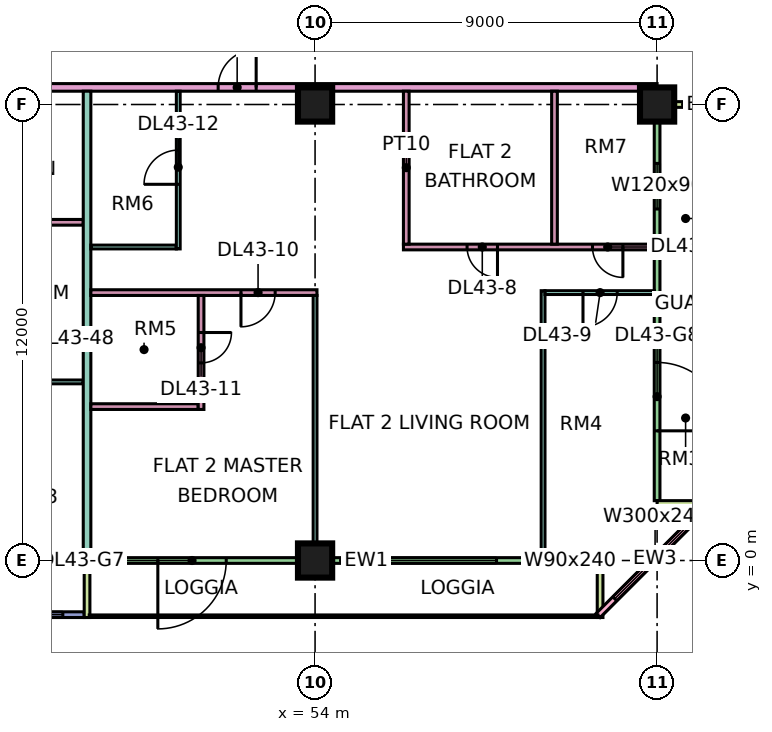
"""IFC4 building model, lengths in metres.
Left out: names, types, materials, properties, quantities, classifications, styles, units other than length and angle.
Written with IfcOpenShell. Run it as: python <this file> out.ifc"""

import sys

from ifc_helpers import new_model, si_unit, direction, frame, frame_2d, origin, origin_2d, place, context, subcontext, project, spatial, rectangle, extrude, element, fill, save


model = new_model("IFC4")
c1 = context("Model", 3, precision=1e-05, world=origin(), true_north=direction((0.0, 1.0)))
c2 = subcontext(c1, "Body", "Model", "MODEL_VIEW")
j1 = project(units=[si_unit("LENGTHUNIT", "METRE"), si_unit("PLANEANGLEUNIT", "RADIAN")], contexts=[c1])
p1 = place(None, origin())
s1 = spatial("IfcSite", under=j1, at=p1, CompositionType="ELEMENT")
p2 = place(p1, origin())
s2 = spatial("IfcBuilding", under=s1, at=p2, CompositionType="ELEMENT")
p3 = place(p2, frame((0.0, 0.0, 187.4)))
s3 = spatial("IfcBuildingStorey", under=s2, at=p3, CompositionType="ELEMENT", Elevation=187.4)
for number, where, z_axis, x_axis in (
    (1, (54.0, 0.0, 0.0), (0.0, 0.0, 1.0), (1.0, 0.0, 0.0)),
    (2, (54.0, 12.0, 0.0), (0.0, 0.0, 1.0), (1.0, 0.0, 0.0)),
    (3, (63.0, 12.0, 0.0), (0.0, 0.0, 1.0), (1.0, 0.0, 0.0)),
):
    element("IfcColumn", number, at=place(p3, frame(where, z_axis=z_axis, x_axis=x_axis)), inside=s3, PredefinedType="COLUMN", context=c2, shape_type="SweptSolid", body=[
        extrude(rectangle(XDim=0.9, YDim=0.9, at=origin_2d()), origin(), (0.0, 0.0, 1.0), 3.75),
    ])
p4 = place(p3, frame((36.075, -1.425, 0.0), z_axis=(0.0, 0.0, 1.0), x_axis=(1.0, 0.0, 0.0)))
e4 = element("IfcWall", 4, at=p4, inside=s3, PredefinedType="SOLIDWALL", context=c2, shape_type="SweptSolid", body=[
    extrude(rectangle(XDim=11.85, YDim=0.15, at=frame_2d((5.925, 0.0))), origin(), (0.0, 0.0, 1.0), 3.35),
])
p5 = place(p4, frame((1.462, 0.0, 0.45)))
e5 = element("IfcOpeningElement", 5, at=p5, cuts=e4, PredefinedType="OPENING", context=c2, shape_type="SweptSolid", body=[
    extrude(rectangle(XDim=3.0, YDim=2.4, at=frame_2d((1.5, 1.2))), frame((0.0, 0.085, 0.0), z_axis=(0.0, -1.0, 0.0), x_axis=(1.0, 0.0, 0.0)), (0.0, 0.0, 1.0), 0.17),
])
p6 = place(p4, frame((6.525, 0.0, 0.45)))
e6 = element("IfcOpeningElement", 6, at=p6, cuts=e4, PredefinedType="OPENING", context=c2, shape_type="SweptSolid", body=[
    extrude(rectangle(XDim=1.8, YDim=2.4, at=frame_2d((0.9, 1.2))), frame((0.0, 0.085, 0.0), z_axis=(0.0, -1.0, 0.0), x_axis=(1.0, 0.0, 0.0)), (0.0, 0.0, 1.0), 0.17),
])
p7 = place(p4, frame((9.488, 0.0, 0.45)))
e7 = element("IfcOpeningElement", 7, at=p7, cuts=e4, PredefinedType="OPENING", context=c2, shape_type="SweptSolid", body=[
    extrude(rectangle(XDim=1.8, YDim=2.4, at=frame_2d((0.9, 1.2))), frame((0.0, 0.085, 0.0), z_axis=(0.0, -1.0, 0.0), x_axis=(1.0, 0.0, 0.0)), (0.0, 0.0, 1.0), 0.17),
])
p8 = place(p3, frame((48.075, 0.0, 0.0), z_axis=(0.0, 0.0, 1.0), x_axis=(1.0, 0.0, 0.0)))
e8 = element("IfcWall", 8, at=p8, inside=s3, PredefinedType="SOLIDWALL", context=c2, shape_type="SweptSolid", body=[
    extrude(rectangle(XDim=13.35, YDim=0.15, at=frame_2d((6.675, 0.0))), origin(), (0.0, 0.0, 1.0), 3.35),
])
p9 = place(p8, frame((1.788, 0.0, 0.0)))
e9 = element("IfcOpeningElement", 9, at=p9, cuts=e8, PredefinedType="OPENING", context=c2, shape_type="SweptSolid", body=[
    extrude(rectangle(XDim=1.8, YDim=2.4, at=frame_2d((0.9, 1.2))), frame((0.0, 0.085, 0.0), z_axis=(0.0, -1.0, 0.0), x_axis=(1.0, 0.0, 0.0)), (0.0, 0.0, 1.0), 0.17),
])
p10 = place(p8, frame((7.7, 0.0, 0.45)))
e10 = element("IfcOpeningElement", 10, at=p10, cuts=e8, PredefinedType="OPENING", context=c2, shape_type="SweptSolid", body=[
    extrude(rectangle(XDim=3.0, YDim=2.4, at=frame_2d((1.5, 1.2))), frame((0.0, 0.085, 0.0), z_axis=(0.0, -1.0, 0.0), x_axis=(1.0, 0.0, 0.0)), (0.0, 0.0, 1.0), 0.17),
])
p11 = place(p8, frame((12.188, 0.0, 0.45)))
e11 = element("IfcOpeningElement", 11, at=p11, cuts=e8, PredefinedType="OPENING", context=c2, shape_type="SweptSolid", body=[
    extrude(rectangle(XDim=0.9, YDim=2.4, at=frame_2d((0.45, 1.2))), frame((0.0, 0.085, 0.0), z_axis=(0.0, -1.0, 0.0), x_axis=(1.0, 0.0, 0.0)), (0.0, 0.0, 1.0), 0.17),
])
for number, where, z_axis, x_axis in (
    (12, (48.0, -1.5, 0.0), (0.0, 0.0, 1.0), (0.0, 1.0, 0.0)),
    (13, (61.5, -1.5, 0.0), (0.0, 0.0, 1.0), (0.0, 1.0, 0.0)),
):
    element("IfcWall", number, at=place(p3, frame(where, z_axis=z_axis, x_axis=x_axis)), inside=s3, PredefinedType="SOLIDWALL", context=c2, shape_type="SweptSolid", body=[
        extrude(rectangle(XDim=1.5, YDim=0.15, at=frame_2d((0.75, 0.0))), origin(), (0.0, 0.0, 1.0), 3.35),
    ])
p12 = place(p3, frame((61.447, -1.447, 0.0), z_axis=(0.0, 0.0, 1.0), x_axis=(0.707106781187, 0.707106781187, 0.0)))
e14 = element("IfcWall", 14, at=p12, inside=s3, PredefinedType="SOLIDWALL", context=c2, shape_type="SweptSolid", body=[
    extrude(rectangle(XDim=4.243, YDim=0.15, at=frame_2d((2.121, 0.0))), origin(), (0.0, 0.0, 1.0), 3.35),
])
p13 = place(p12, frame((0.621, 0.0, 0.45)))
e15 = element("IfcOpeningElement", 15, at=p13, cuts=e14, PredefinedType="OPENING", context=c2, shape_type="SweptSolid", body=[
    extrude(rectangle(XDim=3.0, YDim=2.4, at=frame_2d((1.5, 1.2))), frame((0.0, 0.085, 0.0), z_axis=(0.0, -1.0, 0.0), x_axis=(1.0, 0.0, 0.0)), (0.0, 0.0, 1.0), 0.17),
])
p14 = place(p3, frame((63.0, 1.575, 0.0), z_axis=(0.0, 0.0, 1.0), x_axis=(0.0, 1.0, 0.0)))
e16 = element("IfcWall", 16, at=p14, inside=s3, PredefinedType="SOLIDWALL", context=c2, shape_type="SweptSolid", body=[
    extrude(rectangle(XDim=10.35, YDim=0.15, at=frame_2d((5.175, 0.0))), origin(), (0.0, 0.0, 1.0), 3.35),
])
p15 = place(p14, frame((1.837, 0.0, 0.0)))
e17 = element("IfcOpeningElement", 17, at=p15, cuts=e16, PredefinedType="OPENING", context=c2, shape_type="SweptSolid", body=[
    extrude(rectangle(XDim=1.8, YDim=2.4, at=frame_2d((0.9, 1.2))), frame((0.0, 0.085, 0.0), z_axis=(0.0, -1.0, 0.0), x_axis=(1.0, 0.0, 0.0)), (0.0, 0.0, 1.0), 0.17),
])
p16 = place(p14, frame((7.675, 0.0, 1.7)))
e18 = element("IfcOpeningElement", 18, at=p16, cuts=e16, PredefinedType="OPENING", context=c2, shape_type="SweptSolid", body=[
    extrude(rectangle(XDim=1.2, YDim=0.9, at=frame_2d((0.6, 0.45))), frame((0.0, 0.085, 0.0), z_axis=(0.0, -1.0, 0.0), x_axis=(1.0, 0.0, 0.0)), (0.0, 0.0, 1.0), 0.17),
])
for number, where, z_axis, x_axis in (
    (19, (64.5, 1.5, 0.0), (0.0, 0.0, 1.0), (-1.0, 0.0, 0.0)),
    (20, (64.5, 12.0, 0.0), (0.0, 0.0, 1.0), (-1.0, 0.0, 0.0)),
):
    element("IfcWall", number, at=place(p3, frame(where, z_axis=z_axis, x_axis=x_axis)), inside=s3, PredefinedType="SOLIDWALL", context=c2, shape_type="SweptSolid", body=[
        extrude(rectangle(XDim=1.5, YDim=0.15, at=frame_2d((0.75, 0.0))), origin(), (0.0, 0.0, 1.0), 3.35),
    ])
p17 = place(p3, frame((33.05, 4.7, 0.0), z_axis=(0.0, 0.0, 1.0), x_axis=(1.0, 0.0, 0.0)))
e21 = element("IfcWall", 21, at=p17, inside=s3, PredefinedType="PARTITIONING", context=c2, shape_type="SweptSolid", body=[
    extrude(rectangle(XDim=14.85, YDim=0.1, at=frame_2d((7.425, 0.0))), origin(), (0.0, 0.0, 1.0), 3.35),
])
p18 = place(p17, frame((10.0, 0.0, 0.0)))
e22 = element("IfcOpeningElement", 22, at=p18, cuts=e21, PredefinedType="OPENING", context=c2, shape_type="SweptSolid", body=[
    extrude(rectangle(XDim=0.9, YDim=2.1, at=frame_2d((0.45, 1.05))), frame((0.0, 0.06, 0.0), z_axis=(0.0, -1.0, 0.0), x_axis=(1.0, 0.0, 0.0)), (0.0, 0.0, 1.0), 0.12),
])
p19 = place(p17, frame((13.0, 0.0, 0.0)))
e23 = element("IfcOpeningElement", 23, at=p19, cuts=e21, PredefinedType="OPENING", context=c2, shape_type="SweptSolid", body=[
    extrude(rectangle(XDim=0.9, YDim=2.1, at=frame_2d((0.45, 1.05))), frame((0.0, 0.06, 0.0), z_axis=(0.0, -1.0, 0.0), x_axis=(1.0, 0.0, 0.0)), (0.0, 0.0, 1.0), 0.12),
])
p20 = place(p17, frame((4.0, 0.0, 0.0)))
e24 = element("IfcOpeningElement", 24, at=p20, cuts=e21, PredefinedType="OPENING", context=c2, shape_type="SweptSolid", body=[
    extrude(rectangle(XDim=0.9, YDim=2.1, at=frame_2d((0.45, 1.05))), frame((0.0, 0.06, 0.0), z_axis=(0.0, -1.0, 0.0), x_axis=(1.0, 0.0, 0.0)), (0.0, 0.0, 1.0), 0.12),
])
p21 = place(p3, frame((40.65, 12.45, 0.0), z_axis=(0.0, 0.0, 1.0), x_axis=(1.0, 0.0, 0.0)))
e25 = element("IfcWall", 25, at=p21, inside=s3, PredefinedType="PARTITIONING", context=c2, shape_type="SweptSolid", body=[
    extrude(rectangle(XDim=22.35, YDim=0.2, at=frame_2d((11.175, 0.0))), origin(), (0.0, 0.0, 1.0), 3.35),
])
p22 = place(p21, frame((10.8, 0.0, 0.0)))
e26 = element("IfcOpeningElement", 26, at=p22, cuts=e25, PredefinedType="OPENING", context=c2, shape_type="SweptSolid", body=[
    extrude(rectangle(XDim=1.0, YDim=2.1, at=frame_2d((0.5, 1.05))), frame((0.0, 0.11, 0.0), z_axis=(0.0, -1.0, 0.0), x_axis=(1.0, 0.0, 0.0)), (0.0, 0.0, 1.0), 0.22),
])
p23 = place(p21, frame((1.05, 0.0, 0.0)))
e27 = element("IfcOpeningElement", 27, at=p23, cuts=e25, PredefinedType="OPENING", context=c2, shape_type="SweptSolid", body=[
    extrude(rectangle(XDim=1.0, YDim=2.1, at=frame_2d((0.5, 1.05))), frame((0.0, 0.11, 0.0), z_axis=(0.0, -1.0, 0.0), x_axis=(1.0, 0.0, 0.0)), (0.0, 0.0, 1.0), 0.22),
])
p24 = place(p3, frame((43.725, 5.9, 0.0), z_axis=(0.0, 0.0, 1.0), x_axis=(1.0, 0.0, 0.0)))
e28 = element("IfcWall", 28, at=p24, inside=s3, PredefinedType="PARTITIONING", context=c2, shape_type="SweptSolid", body=[
    extrude(rectangle(XDim=4.175, YDim=0.15, at=frame_2d((2.087, 0.0))), origin(), (0.0, 0.0, 1.0), 3.35),
])
p25 = place(p24, frame((1.675, 0.0, 0.0)))
e29 = element("IfcOpeningElement", 29, at=p25, cuts=e28, PredefinedType="OPENING", context=c2, shape_type="SweptSolid", body=[
    extrude(rectangle(XDim=0.8, YDim=2.1, at=frame_2d((0.4, 1.05))), frame((0.0, 0.085, 0.0), z_axis=(0.0, -1.0, 0.0), x_axis=(1.0, 0.0, 0.0)), (0.0, 0.0, 1.0), 0.17),
])
p26 = place(p3, frame((43.725, 8.9, 0.0), z_axis=(0.0, 0.0, 1.0), x_axis=(1.0, 0.0, 0.0)))
e30 = element("IfcWall", 30, at=p26, inside=s3, PredefinedType="PARTITIONING", context=c2, shape_type="SweptSolid", body=[
    extrude(rectangle(XDim=4.175, YDim=0.15, at=frame_2d((2.087, 0.0))), origin(), (0.0, 0.0, 1.0), 3.35),
])
p27 = place(p3, frame((48.0, 0.0, 0.0), z_axis=(0.0, 0.0, 1.0), x_axis=(0.0, 1.0, 0.0)))
e31 = element("IfcWall", 31, at=p27, inside=s3, PredefinedType="PARTITIONING", context=c2, shape_type="SweptSolid", body=[
    extrude(rectangle(XDim=12.35, YDim=0.2, at=frame_2d((6.175, 0.0))), origin(), (0.0, 0.0, 1.0), 3.35),
])
p28 = place(p3, frame((48.1, 4.05, 0.0), z_axis=(0.0, 0.0, 1.0), x_axis=(1.0, 0.0, 0.0)))
e32 = element("IfcWall", 32, at=p28, inside=s3, PredefinedType="PARTITIONING", context=c2, shape_type="SweptSolid", body=[
    extrude(rectangle(XDim=2.825, YDim=0.15, at=frame_2d((1.413, 0.0))), origin(), (0.0, 0.0, 1.0), 3.35),
])
p29 = place(p3, frame((48.1, 7.05, 0.0), z_axis=(0.0, 0.0, 1.0), x_axis=(1.0, 0.0, 0.0)))
e33 = element("IfcWall", 33, at=p29, inside=s3, PredefinedType="PARTITIONING", context=c2, shape_type="SweptSolid", body=[
    extrude(rectangle(XDim=5.95, YDim=0.15, at=frame_2d((2.975, 0.0))), origin(), (0.0, 0.0, 1.0), 3.35),
])
p30 = place(p29, frame((3.95, 0.0, 0.0)))
e34 = element("IfcOpeningElement", 34, at=p30, cuts=e33, PredefinedType="OPENING", context=c2, shape_type="SweptSolid", body=[
    extrude(rectangle(XDim=0.9, YDim=2.1, at=frame_2d((0.45, 1.05))), frame((0.0, 0.085, 0.0), z_axis=(0.0, -1.0, 0.0), x_axis=(1.0, 0.0, 0.0)), (0.0, 0.0, 1.0), 0.17),
])
p31 = place(p3, frame((48.1, 8.25, 0.0), z_axis=(0.0, 0.0, 1.0), x_axis=(1.0, 0.0, 0.0)))
e35 = element("IfcWall", 35, at=p31, inside=s3, PredefinedType="PARTITIONING", context=c2, shape_type="SweptSolid", body=[
    extrude(rectangle(XDim=2.25, YDim=0.1, at=frame_2d((1.125, 0.0))), origin(), (0.0, 0.0, 1.0), 3.35),
])
p32 = place(p3, frame((50.4, 8.2, 0.0), z_axis=(0.0, 0.0, 1.0), x_axis=(0.0, 1.0, 0.0)))
e36 = element("IfcWall", 36, at=p32, inside=s3, PredefinedType="PARTITIONING", context=c2, shape_type="SweptSolid", body=[
    extrude(rectangle(XDim=4.15, YDim=0.1, at=frame_2d((2.075, 0.0))), origin(), (0.0, 0.0, 1.0), 3.35),
])
p33 = place(p32, frame((1.7, 0.0, 0.0)))
e37 = element("IfcOpeningElement", 37, at=p33, cuts=e36, PredefinedType="OPENING", context=c2, shape_type="SweptSolid", body=[
    extrude(rectangle(XDim=0.9, YDim=2.1, at=frame_2d((0.45, 1.05))), frame((0.0, 0.06, 0.0), z_axis=(0.0, -1.0, 0.0), x_axis=(1.0, 0.0, 0.0)), (0.0, 0.0, 1.0), 0.12),
])
p34 = place(p3, frame((51.0, 3.975, 0.0), z_axis=(0.0, 0.0, 1.0), x_axis=(0.0, 1.0, 0.0)))
e38 = element("IfcWall", 38, at=p34, inside=s3, PredefinedType="PARTITIONING", context=c2, shape_type="SweptSolid", body=[
    extrude(rectangle(XDim=3.0, YDim=0.15, at=frame_2d((1.5, 0.0))), origin(), (0.0, 0.0, 1.0), 3.35),
])
p35 = place(p34, frame((1.225, 0.0, 0.0)))
e39 = element("IfcOpeningElement", 39, at=p35, cuts=e38, PredefinedType="OPENING", context=c2, shape_type="SweptSolid", body=[
    extrude(rectangle(XDim=0.8, YDim=2.1, at=frame_2d((0.4, 1.05))), frame((0.0, 0.085, 0.0), z_axis=(0.0, -1.0, 0.0), x_axis=(1.0, 0.0, 0.0)), (0.0, 0.0, 1.0), 0.17),
])
p36 = place(p3, frame((54.0, 0.074, 0.0), z_axis=(0.0, 0.0, 1.0), x_axis=(0.0, 1.0, 0.0)))
e40 = element("IfcWall", 40, at=p36, inside=s3, PredefinedType="PARTITIONING", context=c2, shape_type="SweptSolid", body=[
    extrude(rectangle(XDim=6.901, YDim=0.1, at=frame_2d((3.451, 0.0))), origin(), (0.0, 0.0, 1.0), 3.35),
])
p37 = place(p3, frame((56.325, 8.25, 0.0), z_axis=(0.0, 0.0, 1.0), x_axis=(1.0, 0.0, 0.0)))
e41 = element("IfcWall", 41, at=p37, inside=s3, PredefinedType="PARTITIONING", context=c2, shape_type="SweptSolid", body=[
    extrude(rectangle(XDim=6.601, YDim=0.15, at=frame_2d((3.301, 0.0))), origin(), (0.0, 0.0, 1.0), 3.35),
])
p38 = place(p37, frame((1.675, 0.0, 0.0)))
e42 = element("IfcOpeningElement", 42, at=p38, cuts=e41, PredefinedType="OPENING", context=c2, shape_type="SweptSolid", body=[
    extrude(rectangle(XDim=0.8, YDim=2.1, at=frame_2d((0.4, 1.05))), frame((0.0, 0.085, 0.0), z_axis=(0.0, -1.0, 0.0), x_axis=(1.0, 0.0, 0.0)), (0.0, 0.0, 1.0), 0.17),
])
p39 = place(p37, frame((4.975, 0.0, 0.0)))
e43 = element("IfcOpeningElement", 43, at=p39, cuts=e41, PredefinedType="OPENING", context=c2, shape_type="SweptSolid", body=[
    extrude(rectangle(XDim=0.8, YDim=2.1, at=frame_2d((0.4, 1.05))), frame((0.0, 0.085, 0.0), z_axis=(0.0, -1.0, 0.0), x_axis=(1.0, 0.0, 0.0)), (0.0, 0.0, 1.0), 0.17),
])
p40 = place(p3, frame((56.4, 8.325, 0.0), z_axis=(0.0, 0.0, 1.0), x_axis=(0.0, 1.0, 0.0)))
e44 = element("IfcWall", 44, at=p40, inside=s3, PredefinedType="PARTITIONING", context=c2, shape_type="SweptSolid", body=[
    extrude(rectangle(XDim=4.025, YDim=0.15, at=frame_2d((2.013, 0.0))), origin(), (0.0, 0.0, 1.0), 3.35),
])
p41 = place(p3, frame((60.0, 0.074, 0.0), z_axis=(0.0, 0.0, 1.0), x_axis=(0.0, 1.0, 0.0)))
e45 = element("IfcWall", 45, at=p41, inside=s3, PredefinedType="PARTITIONING", context=c2, shape_type="SweptSolid", body=[
    extrude(rectangle(XDim=7.026, YDim=0.1, at=frame_2d((3.513, 0.0))), origin(), (0.0, 0.0, 1.0), 3.35),
])
p42 = place(p3, frame((60.05, 7.05, 0.0), z_axis=(0.0, 0.0, 1.0), x_axis=(1.0, 0.0, 0.0)))
e46 = element("IfcWall", 46, at=p42, inside=s3, PredefinedType="PARTITIONING", context=c2, shape_type="SweptSolid", body=[
    extrude(rectangle(XDim=2.876, YDim=0.1, at=frame_2d((1.438, 0.0))), origin(), (0.0, 0.0, 1.0), 3.35),
])
p43 = place(p42, frame((1.0, 0.0, 0.0)))
e47 = element("IfcOpeningElement", 47, at=p43, cuts=e46, PredefinedType="OPENING", context=c2, shape_type="SweptSolid", body=[
    extrude(rectangle(XDim=0.9, YDim=2.1, at=frame_2d((0.45, 1.05))), frame((0.0, 0.06, 0.0), z_axis=(0.0, -1.0, 0.0), x_axis=(1.0, 0.0, 0.0)), (0.0, 0.0, 1.0), 0.12),
])
p44 = place(p3, frame((60.3, 8.325, 0.0), z_axis=(0.0, 0.0, 1.0), x_axis=(0.0, 1.0, 0.0)))
e48 = element("IfcWall", 48, at=p44, inside=s3, PredefinedType="PARTITIONING", context=c2, shape_type="SweptSolid", body=[
    extrude(rectangle(XDim=4.025, YDim=0.15, at=frame_2d((2.013, 0.0))), origin(), (0.0, 0.0, 1.0), 3.35),
])
p45 = place(p7, origin())
e49 = element("IfcWindow", 49, at=p45, inside=s3, PartitioningType="SINGLE_PANEL", PredefinedType="WINDOW", context=c2, shape_type="SweptSolid", body=[
    extrude(rectangle(XDim=1.8, YDim=2.4, at=frame_2d((0.9, 1.2))), frame((0.0, 0.03, 0.0), z_axis=(0.0, -1.0, 0.0), x_axis=(1.0, 0.0, 0.0)), (0.0, 0.0, 1.0), 0.06),
])
fill(e7, e49)
p46 = place(p9, frame((1.8, 0.0, 0.0), z_axis=(0.0, 0.0, 1.0), x_axis=(-1.0, 0.0, 0.0)))
e50 = element("IfcDoor", 50, at=p46, inside=s3, OperationType="DOUBLE_DOOR_SINGLE_SWING", PredefinedType="DOOR", context=c2, shape_type="SweptSolid", body=[
    extrude(rectangle(XDim=1.8, YDim=2.4, at=frame_2d((0.9, 1.2))), frame((0.0, 0.025, 0.0), z_axis=(0.0, -1.0, 0.0), x_axis=(1.0, 0.0, 0.0)), (0.0, 0.0, 1.0), 0.05),
])
fill(e9, e50)
p47 = place(p10, origin())
e51 = element("IfcWindow", 51, at=p47, inside=s3, PartitioningType="SINGLE_PANEL", PredefinedType="WINDOW", context=c2, shape_type="SweptSolid", body=[
    extrude(rectangle(XDim=3.0, YDim=2.4, at=frame_2d((1.5, 1.2))), frame((0.0, 0.03, 0.0), z_axis=(0.0, -1.0, 0.0), x_axis=(1.0, 0.0, 0.0)), (0.0, 0.0, 1.0), 0.06),
])
fill(e10, e51)
p48 = place(p11, origin())
e52 = element("IfcWindow", 52, at=p48, inside=s3, PartitioningType="SINGLE_PANEL", PredefinedType="WINDOW", context=c2, shape_type="SweptSolid", body=[
    extrude(rectangle(XDim=0.9, YDim=2.4, at=frame_2d((0.45, 1.2))), frame((0.0, 0.03, 0.0), z_axis=(0.0, -1.0, 0.0), x_axis=(1.0, 0.0, 0.0)), (0.0, 0.0, 1.0), 0.06),
])
fill(e11, e52)
p49 = place(p13, origin())
e53 = element("IfcWindow", 53, at=p49, inside=s3, PartitioningType="SINGLE_PANEL", PredefinedType="WINDOW", context=c2, shape_type="SweptSolid", body=[
    extrude(rectangle(XDim=3.0, YDim=2.4, at=frame_2d((1.5, 1.2))), frame((0.0, 0.03, 0.0), z_axis=(0.0, -1.0, 0.0), x_axis=(1.0, 0.0, 0.0)), (0.0, 0.0, 1.0), 0.06),
])
fill(e15, e53)
p50 = place(p15, frame((1.8, 0.0, 0.0), z_axis=(0.0, 0.0, 1.0), x_axis=(-1.0, 0.0, 0.0)))
e54 = element("IfcDoor", 54, at=p50, inside=s3, OperationType="DOUBLE_DOOR_SINGLE_SWING", PredefinedType="DOOR", context=c2, shape_type="SweptSolid", body=[
    extrude(rectangle(XDim=1.8, YDim=2.4, at=frame_2d((0.9, 1.2))), frame((0.0, 0.025, 0.0), z_axis=(0.0, -1.0, 0.0), x_axis=(1.0, 0.0, 0.0)), (0.0, 0.0, 1.0), 0.05),
])
fill(e17, e54)
p51 = place(p16, origin())
e55 = element("IfcWindow", 55, at=p51, inside=s3, PartitioningType="SINGLE_PANEL", PredefinedType="WINDOW", context=c2, shape_type="SweptSolid", body=[
    extrude(rectangle(XDim=1.2, YDim=0.9, at=frame_2d((0.6, 0.45))), frame((0.0, 0.03, 0.0), z_axis=(0.0, -1.0, 0.0), x_axis=(1.0, 0.0, 0.0)), (0.0, 0.0, 1.0), 0.06),
])
fill(e18, e55)
p52 = place(p38, origin())
e56 = element("IfcDoor", 56, at=p52, inside=s3, OperationType="SINGLE_SWING_RIGHT", PredefinedType="DOOR", context=c2, shape_type="SweptSolid", body=[
    extrude(rectangle(XDim=0.8, YDim=2.1, at=frame_2d((0.4, 1.05))), frame((0.0, 0.025, 0.0), z_axis=(0.0, -1.0, 0.0), x_axis=(1.0, 0.0, 0.0)), (0.0, 0.0, 1.0), 0.05),
])
fill(e42, e56)
p53 = place(p43, frame((0.9, 0.0, 0.0), z_axis=(0.0, 0.0, 1.0), x_axis=(-1.0, 0.0, 0.0)))
e57 = element("IfcDoor", 57, at=p53, inside=s3, OperationType="SINGLE_SWING_LEFT", PredefinedType="DOOR", context=c2, shape_type="SweptSolid", body=[
    extrude(rectangle(XDim=0.9, YDim=2.1, at=frame_2d((0.45, 1.05))), frame((0.0, 0.025, 0.0), z_axis=(0.0, -1.0, 0.0), x_axis=(1.0, 0.0, 0.0)), (0.0, 0.0, 1.0), 0.05),
])
fill(e47, e57)
p54 = place(p30, frame((0.9, 0.0, 0.0), z_axis=(0.0, 0.0, 1.0), x_axis=(-1.0, 0.0, 0.0)))
e58 = element("IfcDoor", 58, at=p54, inside=s3, OperationType="SINGLE_SWING_LEFT", PredefinedType="DOOR", context=c2, shape_type="SweptSolid", body=[
    extrude(rectangle(XDim=0.9, YDim=2.1, at=frame_2d((0.45, 1.05))), frame((0.0, 0.025, 0.0), z_axis=(0.0, -1.0, 0.0), x_axis=(1.0, 0.0, 0.0)), (0.0, 0.0, 1.0), 0.05),
])
fill(e34, e58)
p55 = place(p35, origin())
e59 = element("IfcDoor", 59, at=p55, inside=s3, OperationType="SINGLE_SWING_RIGHT", PredefinedType="DOOR", context=c2, shape_type="SweptSolid", body=[
    extrude(rectangle(XDim=0.8, YDim=2.1, at=frame_2d((0.4, 1.05))), frame((0.0, 0.025, 0.0), z_axis=(0.0, -1.0, 0.0), x_axis=(1.0, 0.0, 0.0)), (0.0, 0.0, 1.0), 0.05),
])
fill(e39, e59)
p56 = place(p33, origin())
e60 = element("IfcDoor", 60, at=p56, inside=s3, OperationType="SINGLE_SWING_LEFT", PredefinedType="DOOR", context=c2, shape_type="SweptSolid", body=[
    extrude(rectangle(XDim=0.9, YDim=2.1, at=frame_2d((0.45, 1.05))), frame((0.0, 0.025, 0.0), z_axis=(0.0, -1.0, 0.0), x_axis=(1.0, 0.0, 0.0)), (0.0, 0.0, 1.0), 0.05),
])
fill(e37, e60)
p57 = place(p39, origin())
e61 = element("IfcDoor", 61, at=p57, inside=s3, OperationType="SINGLE_SWING_RIGHT", PredefinedType="DOOR", context=c2, shape_type="SweptSolid", body=[
    extrude(rectangle(XDim=0.8, YDim=2.1, at=frame_2d((0.4, 1.05))), frame((0.0, 0.025, 0.0), z_axis=(0.0, -1.0, 0.0), x_axis=(1.0, 0.0, 0.0)), (0.0, 0.0, 1.0), 0.05),
])
fill(e43, e61)
p58 = place(p22, frame((1.0, 0.0, 0.0), z_axis=(0.0, 0.0, 1.0), x_axis=(-1.0, 0.0, 0.0)))
e62 = element("IfcDoor", 62, at=p58, inside=s3, OperationType="SINGLE_SWING_RIGHT", PredefinedType="DOOR", context=c2, shape_type="SweptSolid", body=[
    extrude(rectangle(XDim=1.0, YDim=2.1, at=frame_2d((0.5, 1.05))), frame((0.0, 0.025, 0.0), z_axis=(0.0, -1.0, 0.0), x_axis=(1.0, 0.0, 0.0)), (0.0, 0.0, 1.0), 0.05),
])
fill(e26, e62)
save(model, sys.argv[1])
